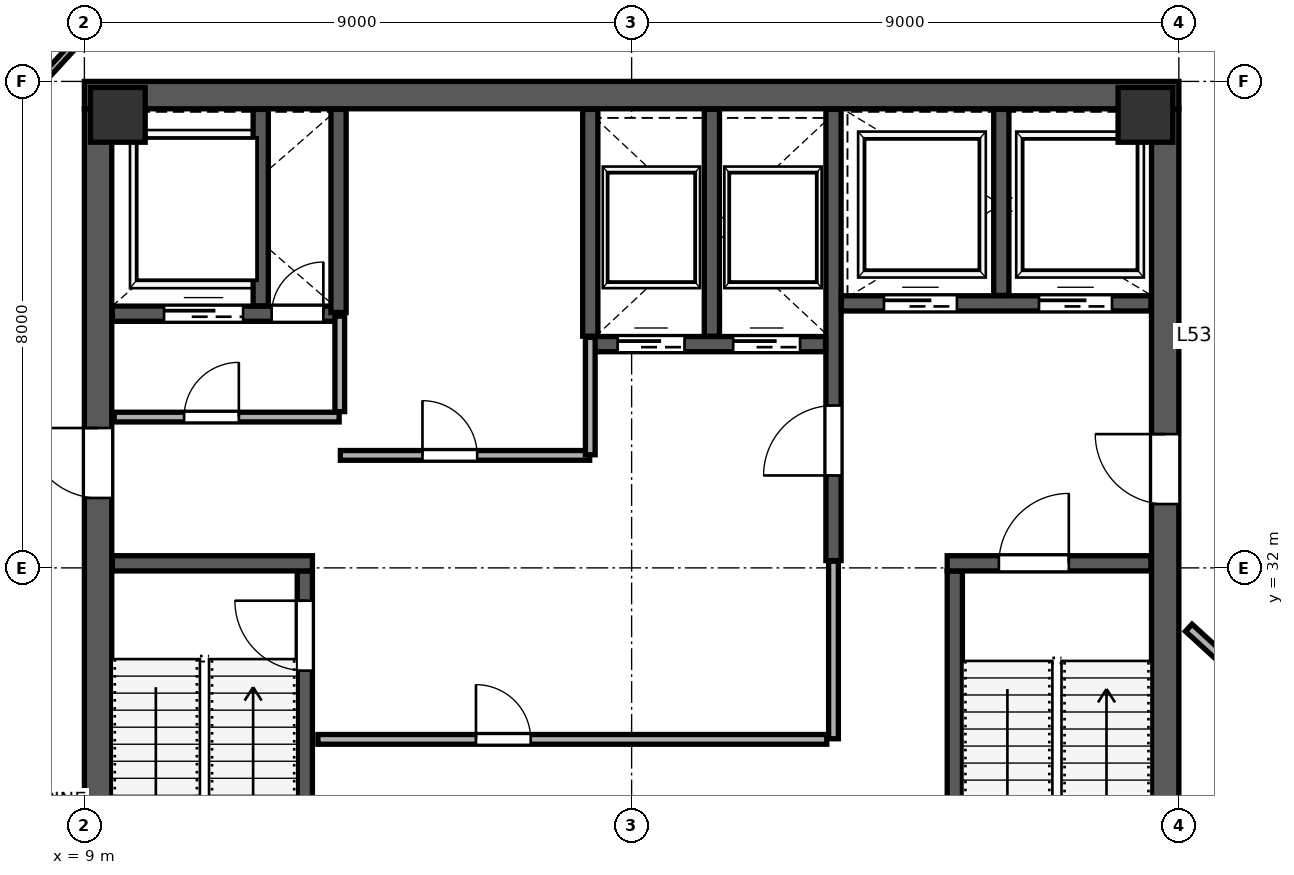
"""IFC4 building model, lengths in metres.
Left out: names, types, materials, properties, quantities, classifications, styles, units other than length and angle.
Written with IfcOpenShell. Run it as: python <this file> out.ifc"""

import sys

from ifc_helpers import new_model, si_unit, direction, frame, frame_2d, origin, origin_2d, place, context, subcontext, project, spatial, rectangle, extrude, source, transform, mapped, element, fill, save


model = new_model("IFC4")
c1 = context("Model", 3, precision=1e-05, world=origin(), true_north=direction((0.0, 1.0)))
c2 = subcontext(c1, "Body", "Model", "MODEL_VIEW")
j1 = project(units=[si_unit("LENGTHUNIT", "METRE"), si_unit("PLANEANGLEUNIT", "RADIAN")], contexts=[c1])
p1 = place(None, origin())
s1 = spatial("IfcSite", under=j1, at=p1, CompositionType="ELEMENT")
p2 = place(p1, origin())
s2 = spatial("IfcBuilding", under=s1, at=p2, CompositionType="ELEMENT")
p3 = place(p2, frame((0.0, 0.0, 237.4)))
s3 = spatial("IfcBuildingStorey", under=s2, at=p3, CompositionType="ELEMENT", Elevation=237.4)
m1 = source(origin(), c2, "Body", "SweptSolid", [
    extrude(rectangle(XDim=0.9, YDim=0.9, at=origin_2d()), origin(), (0.0, 0.0, 1.0), 4.199),
])
for number, where, z_axis, x_axis in (
    (1, (9.55, 39.45, 0.001), (0.0, 0.0, 1.0), (1.0, 0.0, 0.0)),
    (2, (26.45, 39.45, 0.001), (0.0, 0.0, 1.0), (1.0, 0.0, 0.0)),
):
    element("IfcColumn", number, at=place(p3, frame(where, z_axis=z_axis, x_axis=x_axis)), inside=s3, PredefinedType="COLUMN", context=c2, shape_type="MappedRepresentation", body=[
        mapped(m1, transform((0.0, 0.0, 0.0), scale=1.0)),
    ])
p4 = place(p3, frame((9.225, 24.45, 0.0), z_axis=(0.0, 0.0, 1.0), x_axis=(0.0, 1.0, 0.0)))
e3 = element("IfcWall", 3, at=p4, inside=s3, PredefinedType="SHEAR", context=c2, shape_type="SweptSolid", body=[
    extrude(rectangle(XDim=15.1, YDim=0.45, at=frame_2d((7.55, 0.0))), origin(), (0.0, 0.0, 1.0), 3.96),
])
p5 = place(p4, frame((8.7, 0.0, 0.0)))
e4 = element("IfcOpeningElement", 4, at=p5, cuts=e3, PredefinedType="OPENING", context=c2, shape_type="SweptSolid", body=[
    extrude(rectangle(XDim=1.15, YDim=2.2, at=frame_2d((0.575, 1.1))), frame((0.0, 0.235, 0.0), z_axis=(0.0, -1.0, 0.0), x_axis=(1.0, 0.0, 0.0)), (0.0, 0.0, 1.0), 0.47),
])
p6 = place(p3, frame((26.775, 24.45, 0.0), z_axis=(0.0, 0.0, 1.0), x_axis=(0.0, 1.0, 0.0)))
e5 = element("IfcWall", 5, at=p6, inside=s3, PredefinedType="SHEAR", context=c2, shape_type="SweptSolid", body=[
    extrude(rectangle(XDim=15.1, YDim=0.45, at=frame_2d((7.55, 0.0))), origin(), (0.0, 0.0, 1.0), 3.96),
])
p7 = place(p6, frame((8.6, 0.0, 0.0)))
e6 = element("IfcOpeningElement", 6, at=p7, cuts=e5, PredefinedType="OPENING", context=c2, shape_type="SweptSolid", body=[
    extrude(rectangle(XDim=1.15, YDim=2.2, at=frame_2d((0.575, 1.1))), frame((0.0, 0.235, 0.0), z_axis=(0.0, -1.0, 0.0), x_axis=(1.0, 0.0, 0.0)), (0.0, 0.0, 1.0), 0.47),
])
p8 = place(p3, frame((9.0, 39.775, 0.0), z_axis=(0.0, 0.0, 1.0), x_axis=(1.0, 0.0, 0.0)))
e7 = element("IfcWall", 7, at=p8, inside=s3, PredefinedType="SHEAR", context=c2, shape_type="SweptSolid", body=[
    extrude(rectangle(XDim=18.0, YDim=0.45, at=frame_2d((9.0, 0.0))), origin(), (0.0, 0.0, 1.0), 3.96),
])
p9 = place(p3, frame((12.625, 24.46, 0.0), z_axis=(0.0, 0.0, 1.0), x_axis=(0.0, 1.0, 0.0)))
e8 = element("IfcWall", 8, at=p9, inside=s3, PredefinedType="SHEAR", context=c2, shape_type="SweptSolid", body=[
    extrude(rectangle(XDim=7.49, YDim=0.25, at=frame_2d((3.745, 0.0))), origin(), (0.0, 0.0, 1.0), 3.96),
])
p10 = place(p9, frame((5.85, 0.0, 0.0)))
e9 = element("IfcOpeningElement", 9, at=p10, cuts=e8, PredefinedType="OPENING", context=c2, shape_type="SweptSolid", body=[
    extrude(rectangle(XDim=1.15, YDim=2.2, at=frame_2d((0.575, 1.1))), frame((0.0, 0.135, 0.0), z_axis=(0.0, -1.0, 0.0), x_axis=(1.0, 0.0, 0.0)), (0.0, 0.0, 1.0), 0.27),
])
p11 = place(p3, frame((9.46, 32.075, 0.0), z_axis=(0.0, 0.0, 1.0), x_axis=(1.0, 0.0, 0.0)))
e10 = element("IfcWall", 10, at=p11, inside=s3, PredefinedType="SHEAR", context=c2, shape_type="SweptSolid", body=[
    extrude(rectangle(XDim=3.29, YDim=0.25, at=frame_2d((1.645, 0.0))), origin(), (0.0, 0.0, 1.0), 3.96),
])
p12 = place(p3, frame((23.315, 24.46, 0.0), z_axis=(0.0, 0.0, 1.0), x_axis=(0.0, 1.0, 0.0)))
e11 = element("IfcWall", 11, at=p12, inside=s3, PredefinedType="SHEAR", context=c2, shape_type="SweptSolid", body=[
    extrude(rectangle(XDim=7.49, YDim=0.25, at=frame_2d((3.745, 0.0))), origin(), (0.0, 0.0, 1.0), 3.96),
])
p13 = place(p3, frame((23.19, 32.075, 0.0), z_axis=(0.0, 0.0, 1.0), x_axis=(1.0, 0.0, 0.0)))
e12 = element("IfcWall", 12, at=p13, inside=s3, PredefinedType="SHEAR", context=c2, shape_type="SweptSolid", body=[
    extrude(rectangle(XDim=3.35, YDim=0.25, at=frame_2d((1.675, 0.0))), origin(), (0.0, 0.0, 1.0), 3.96),
])
p14 = place(p13, frame((0.85, 0.0, 0.0)))
e13 = element("IfcOpeningElement", 13, at=p14, cuts=e12, PredefinedType="OPENING", context=c2, shape_type="SweptSolid", body=[
    extrude(rectangle(XDim=1.15, YDim=2.2, at=frame_2d((0.575, 1.1))), frame((0.0, 0.135, 0.0), z_axis=(0.0, -1.0, 0.0), x_axis=(1.0, 0.0, 0.0)), (0.0, 0.0, 1.0), 0.27),
])
p15 = place(p3, frame((21.32, 32.12, 0.0), z_axis=(0.0, 0.0, 1.0), x_axis=(0.0, 1.0, 0.0)))
e14 = element("IfcWall", 14, at=p15, inside=s3, PredefinedType="SHEAR", context=c2, shape_type="SweptSolid", body=[
    extrude(rectangle(XDim=7.42, YDim=0.25, at=frame_2d((3.71, 0.0))), origin(), (0.0, 0.0, 1.0), 3.96),
])
p16 = place(p15, frame((1.4, 0.0, 0.0)))
e15 = element("IfcOpeningElement", 15, at=p16, cuts=e14, PredefinedType="OPENING", context=c2, shape_type="SweptSolid", body=[
    extrude(rectangle(XDim=1.15, YDim=2.2, at=frame_2d((0.575, 1.1))), frame((0.0, 0.135, 0.0), z_axis=(0.0, -1.0, 0.0), x_axis=(1.0, 0.0, 0.0)), (0.0, 0.0, 1.0), 0.27),
])
p17 = place(p3, frame((9.46, 36.18, 0.0), z_axis=(0.0, 0.0, 1.0), x_axis=(1.0, 0.0, 0.0)))
e16 = element("IfcWall", 16, at=p17, inside=s3, PredefinedType="SHEAR", context=c2, shape_type="SweptSolid", body=[
    extrude(rectangle(XDim=3.79, YDim=0.25, at=frame_2d((1.895, 0.0))), origin(), (0.0, 0.0, 1.0), 3.96),
])
p18 = place(p17, frame((2.62, 0.0, 0.0)))
e17 = element("IfcOpeningElement", 17, at=p18, cuts=e16, PredefinedType="OPENING", context=c2, shape_type="SweptSolid", body=[
    extrude(rectangle(XDim=0.85, YDim=2.1, at=frame_2d((0.425, 1.05))), frame((0.0, 0.135, 0.0), z_axis=(0.0, -1.0, 0.0), x_axis=(1.0, 0.0, 0.0)), (0.0, 0.0, 1.0), 0.27),
])
p19 = place(p17, frame((0.85, 0.0, 0.0)))
e18 = element("IfcOpeningElement", 18, at=p19, cuts=e16, PredefinedType="OPENING", context=c2, shape_type="SweptSolid", body=[
    extrude(rectangle(XDim=1.3, YDim=2.25, at=frame_2d((0.65, 1.125))), frame((0.0, 0.135, 0.0), z_axis=(0.0, -1.0, 0.0), x_axis=(1.0, 0.0, 0.0)), (0.0, 0.0, 1.0), 0.27),
])
p20 = place(p3, frame((11.9, 36.31, 0.0), z_axis=(0.0, 0.0, 1.0), x_axis=(0.0, 1.0, 0.0)))
e19 = element("IfcWall", 19, at=p20, inside=s3, PredefinedType="SHEAR", context=c2, shape_type="SweptSolid", body=[
    extrude(rectangle(XDim=3.23, YDim=0.25, at=frame_2d((1.615, 0.0))), origin(), (0.0, 0.0, 1.0), 3.96),
])
p21 = place(p3, frame((21.45, 36.35, 0.0), z_axis=(0.0, 0.0, 1.0), x_axis=(1.0, 0.0, 0.0)))
e20 = element("IfcWall", 20, at=p21, inside=s3, PredefinedType="SHEAR", context=c2, shape_type="SweptSolid", body=[
    extrude(rectangle(XDim=5.09, YDim=0.25, at=frame_2d((2.545, 0.0))), origin(), (0.0, 0.0, 1.0), 3.96),
])
p22 = place(p21, frame((0.7, 0.0, 0.0)))
e21 = element("IfcOpeningElement", 21, at=p22, cuts=e20, PredefinedType="OPENING", context=c2, shape_type="SweptSolid", body=[
    extrude(rectangle(XDim=1.2, YDim=2.2, at=frame_2d((0.6, 1.1))), frame((0.0, 0.135, 0.0), z_axis=(0.0, -1.0, 0.0), x_axis=(1.0, 0.0, 0.0)), (0.0, 0.0, 1.0), 0.27),
])
p23 = place(p21, frame((3.25, 0.0, 0.0)))
e22 = element("IfcOpeningElement", 22, at=p23, cuts=e20, PredefinedType="OPENING", context=c2, shape_type="SweptSolid", body=[
    extrude(rectangle(XDim=1.2, YDim=2.2, at=frame_2d((0.6, 1.1))), frame((0.0, 0.135, 0.0), z_axis=(0.0, -1.0, 0.0), x_axis=(1.0, 0.0, 0.0)), (0.0, 0.0, 1.0), 0.27),
])
p24 = place(p3, frame((24.08, 36.48, 0.0), z_axis=(0.0, 0.0, 1.0), x_axis=(0.0, 1.0, 0.0)))
e23 = element("IfcWall", 23, at=p24, inside=s3, PredefinedType="SHEAR", context=c2, shape_type="SweptSolid", body=[
    extrude(rectangle(XDim=3.06, YDim=0.25, at=frame_2d((1.53, 0.0))), origin(), (0.0, 0.0, 1.0), 3.96),
])
p25 = place(p3, frame((13.18, 36.2, 0.0), z_axis=(0.0, 0.0, 1.0), x_axis=(0.0, 1.0, 0.0)))
e24 = element("IfcWall", 24, at=p25, inside=s3, PredefinedType="SHEAR", context=c2, shape_type="SweptSolid", body=[
    extrude(rectangle(XDim=3.34, YDim=0.25, at=frame_2d((1.67, 0.0))), origin(), (0.0, 0.0, 1.0), 3.96),
])
p26 = place(p3, frame((17.32, 35.68, 0.0), z_axis=(0.0, 0.0, 1.0), x_axis=(1.0, 0.0, 0.0)))
e25 = element("IfcWall", 25, at=p26, inside=s3, PredefinedType="SHEAR", context=c2, shape_type="SweptSolid", body=[
    extrude(rectangle(XDim=3.87, YDim=0.25, at=frame_2d((1.935, 0.0))), origin(), (0.0, 0.0, 1.0), 3.96),
])
p27 = place(p26, frame((0.45, 0.0, 0.0)))
e26 = element("IfcOpeningElement", 26, at=p27, cuts=e25, PredefinedType="OPENING", context=c2, shape_type="SweptSolid", body=[
    extrude(rectangle(XDim=1.1, YDim=2.2, at=frame_2d((0.55, 1.1))), frame((0.0, 0.135, 0.0), z_axis=(0.0, -1.0, 0.0), x_axis=(1.0, 0.0, 0.0)), (0.0, 0.0, 1.0), 0.27),
])
p28 = place(p26, frame((2.35, 0.0, 0.0)))
e27 = element("IfcOpeningElement", 27, at=p28, cuts=e25, PredefinedType="OPENING", context=c2, shape_type="SweptSolid", body=[
    extrude(rectangle(XDim=1.1, YDim=2.2, at=frame_2d((0.55, 1.1))), frame((0.0, 0.135, 0.0), z_axis=(0.0, -1.0, 0.0), x_axis=(1.0, 0.0, 0.0)), (0.0, 0.0, 1.0), 0.27),
])
for number, where, z_axis, x_axis in (
    (28, (17.32, 35.81, 0.0), (0.0, 0.0, 1.0), (0.0, 1.0, 0.0)),
    (29, (19.32, 35.81, 0.0), (0.0, 0.0, 1.0), (0.0, 1.0, 0.0)),
):
    element("IfcWall", number, at=place(p3, frame(where, z_axis=z_axis, x_axis=x_axis)), inside=s3, PredefinedType="SHEAR", context=c2, shape_type="SweptSolid", body=[
        extrude(rectangle(XDim=3.73, YDim=0.25, at=frame_2d((1.865, 0.0))), origin(), (0.0, 0.0, 1.0), 3.96),
    ])
p29 = place(p3, frame((9.49, 34.48, 0.0), z_axis=(0.0, 0.0, 1.0), x_axis=(1.0, 0.0, 0.0)))
e30 = element("IfcWall", 30, at=p29, inside=s3, PredefinedType="PARTITIONING", context=c2, shape_type="SweptSolid", body=[
    extrude(rectangle(XDim=3.7, YDim=0.16, at=frame_2d((1.85, 0.0))), origin(), (0.0, 0.0, 1.0), 3.96),
])
p30 = place(p29, frame((1.15, 0.0, 0.0)))
e31 = element("IfcOpeningElement", 31, at=p30, cuts=e30, PredefinedType="OPENING", context=c2, shape_type="SweptSolid", body=[
    extrude(rectangle(XDim=0.9, YDim=2.15, at=frame_2d((0.45, 1.075))), frame((0.0, 0.09, 0.0), z_axis=(0.0, -1.0, 0.0), x_axis=(1.0, 0.0, 0.0)), (0.0, 0.0, 1.0), 0.18),
])
p31 = place(p3, frame((13.2, 34.57, 0.0), z_axis=(0.0, 0.0, 1.0), x_axis=(0.0, 1.0, 0.0)))
e32 = element("IfcWall", 32, at=p31, inside=s3, PredefinedType="PARTITIONING", context=c2, shape_type="SweptSolid", body=[
    extrude(rectangle(XDim=1.57, YDim=0.16, at=frame_2d((0.785, 0.0))), origin(), (0.0, 0.0, 1.0), 3.96),
])
p32 = place(p3, frame((13.21, 33.85, 0.0), z_axis=(0.0, 0.0, 1.0), x_axis=(1.0, 0.0, 0.0)))
e33 = element("IfcWall", 33, at=p32, inside=s3, PredefinedType="PARTITIONING", context=c2, shape_type="SweptSolid", body=[
    extrude(rectangle(XDim=4.1, YDim=0.16, at=frame_2d((2.05, 0.0))), origin(), (0.0, 0.0, 1.0), 3.96),
])
p33 = place(p32, frame((1.35, 0.0, 0.0)))
e34 = element("IfcOpeningElement", 34, at=p33, cuts=e33, PredefinedType="OPENING", context=c2, shape_type="SweptSolid", body=[
    extrude(rectangle(XDim=0.9, YDim=2.15, at=frame_2d((0.45, 1.075))), frame((0.0, 0.09, 0.0), z_axis=(0.0, -1.0, 0.0), x_axis=(1.0, 0.0, 0.0)), (0.0, 0.0, 1.0), 0.18),
])
p34 = place(p3, frame((17.32, 33.86, 0.0), z_axis=(0.0, 0.0, 1.0), x_axis=(0.0, 1.0, 0.0)))
e35 = element("IfcWall", 35, at=p34, inside=s3, PredefinedType="PARTITIONING", context=c2, shape_type="SweptSolid", body=[
    extrude(rectangle(XDim=1.93, YDim=0.16, at=frame_2d((0.965, 0.0))), origin(), (0.0, 0.0, 1.0), 3.96),
])
p35 = place(p3, frame((12.84, 29.18, 0.0), z_axis=(0.0, 0.0, 1.0), x_axis=(1.0, 0.0, 0.0)))
e36 = element("IfcWall", 36, at=p35, inside=s3, PredefinedType="PARTITIONING", context=c2, shape_type="SweptSolid", body=[
    extrude(rectangle(XDim=8.37, YDim=0.16, at=frame_2d((4.185, 0.0))), origin(), (0.0, 0.0, 1.0), 3.96),
])
p36 = place(p35, frame((2.6, 0.0, 0.0)))
e37 = element("IfcOpeningElement", 37, at=p36, cuts=e36, PredefinedType="OPENING", context=c2, shape_type="SweptSolid", body=[
    extrude(rectangle(XDim=0.9, YDim=2.15, at=frame_2d((0.45, 1.075))), frame((0.0, 0.09, 0.0), z_axis=(0.0, -1.0, 0.0), x_axis=(1.0, 0.0, 0.0)), (0.0, 0.0, 1.0), 0.18),
])
p37 = place(p3, frame((21.32, 29.19, 0.0), z_axis=(0.0, 0.0, 1.0), x_axis=(0.0, 1.0, 0.0)))
e38 = element("IfcWall", 38, at=p37, inside=s3, PredefinedType="PARTITIONING", context=c2, shape_type="SweptSolid", body=[
    extrude(rectangle(XDim=2.92, YDim=0.16, at=frame_2d((1.46, 0.0))), origin(), (0.0, 0.0, 1.0), 3.96),
])
p38 = place(p3, frame((27.163, 31.016, 0.0), z_axis=(0.0, 0.0, 1.0), x_axis=(0.737296869908, -0.675568890361, 0.0)))
e39 = element("IfcWall", 39, at=p38, inside=s3, PredefinedType="PARTITIONING", context=c2, shape_type="SweptSolid", body=[
    extrude(rectangle(XDim=1.42, YDim=0.16, at=frame_2d((0.71, 0.0))), origin(), (0.0, 0.0, 1.0), 3.96),
])
p39 = place(p3, frame((17.504, 50.744, 0.0), z_axis=(0.0, 0.0, 1.0), x_axis=(0.737277850523, -0.675589646996, 0.0)))
e40 = element("IfcWall", 40, at=p39, inside=s3, PredefinedType="PARTITIONING", context=c2, shape_type="SweptSolid", body=[
    extrude(rectangle(XDim=21.87, YDim=0.1, at=frame_2d((10.935, 0.0))), origin(), (0.0, 0.0, 1.0), 3.96),
])
p40 = place(p39, frame((5.4, 0.0, 0.0)))
e41 = element("IfcOpeningElement", 41, at=p40, cuts=e40, PredefinedType="OPENING", context=c2, shape_type="SweptSolid", body=[
    extrude(rectangle(XDim=0.95, YDim=2.15, at=frame_2d((0.475, 1.075))), frame((0.0, 0.06, 0.0), z_axis=(0.0, -1.0, 0.0), x_axis=(1.0, 0.0, 0.0)), (0.0, 0.0, 1.0), 0.12),
])
p41 = place(p3, frame((1.73, 32.85, 0.0), z_axis=(0.0, 0.0, 1.0), x_axis=(0.675589845589, 0.737277668546, 0.0)))
e42 = element("IfcWall", 42, at=p41, inside=s3, PredefinedType="PARTITIONING", context=c2, shape_type="SweptSolid", body=[
    extrude(rectangle(XDim=26.742, YDim=0.115, at=frame_2d((13.371, 0.0))), origin(), (0.0, 0.0, 1.0), 3.96),
])
m2 = source(origin(), c2, "Body", "SweptSolid", [
    extrude(rectangle(XDim=1.15, YDim=2.2, at=frame_2d((0.575, 1.1))), frame((0.0, 0.025, 0.0), z_axis=(0.0, -1.0, 0.0), x_axis=(1.0, 0.0, 0.0)), (0.0, 0.0, 1.0), 0.05),
])
p42 = place(p10, origin())
e43 = element("IfcDoor", 43, at=p42, inside=s3, OperationType="SINGLE_SWING_RIGHT", PredefinedType="DOOR", context=c2, shape_type="MappedRepresentation", body=[
    mapped(m2, transform((0.0, 0.0, 0.0), scale=1.0)),
])
fill(e9, e43)
m3 = source(origin(), c2, "Body", "SweptSolid", [
    extrude(rectangle(XDim=1.15, YDim=2.2, at=frame_2d((0.575, 1.1))), frame((0.0, 0.025, 0.0), z_axis=(0.0, -1.0, 0.0), x_axis=(1.0, 0.0, 0.0)), (0.0, 0.0, 1.0), 0.05),
])
p43 = place(p16, origin())
e44 = element("IfcDoor", 44, at=p43, inside=s3, OperationType="SINGLE_SWING_LEFT", PredefinedType="DOOR", context=c2, shape_type="MappedRepresentation", body=[
    mapped(m3, transform((0.0, 0.0, 0.0), scale=1.0)),
])
fill(e15, e44)
p44 = place(p14, origin())
e45 = element("IfcDoor", 45, at=p44, inside=s3, OperationType="SINGLE_SWING_RIGHT", PredefinedType="DOOR", context=c2, shape_type="MappedRepresentation", body=[
    mapped(m2, transform((0.0, 0.0, 0.0), scale=1.0)),
])
fill(e13, e45)
p45 = place(p7, origin())
e46 = element("IfcDoor", 46, at=p45, inside=s3, OperationType="SINGLE_SWING_RIGHT", PredefinedType="DOOR", context=c2, shape_type="MappedRepresentation", body=[
    mapped(m3, transform((0.0, 0.0, 0.0), scale=1.0)),
])
fill(e6, e46)
p46 = place(p5, origin())
e47 = element("IfcDoor", 47, at=p46, inside=s3, OperationType="SINGLE_SWING_RIGHT", PredefinedType="DOOR", context=c2, shape_type="MappedRepresentation", body=[
    mapped(m3, transform((0.0, 0.0, 0.0), scale=1.0)),
])
fill(e4, e47)
m4 = source(origin(), c2, "Body", "SweptSolid", [
    extrude(rectangle(XDim=0.85, YDim=2.1, at=frame_2d((0.425, 1.05))), frame((0.0, 0.025, 0.0), z_axis=(0.0, -1.0, 0.0), x_axis=(1.0, 0.0, 0.0)), (0.0, 0.0, 1.0), 0.05),
])
p47 = place(p18, origin())
e48 = element("IfcDoor", 48, at=p47, inside=s3, OperationType="SINGLE_SWING_RIGHT", PredefinedType="DOOR", context=c2, shape_type="MappedRepresentation", body=[
    mapped(m4, transform((0.0, 0.0, 0.0), scale=1.0)),
])
fill(e17, e48)
m5 = source(origin(), c2, "Body", "SweptSolid", [
    extrude(rectangle(XDim=1.1, YDim=2.2, at=frame_2d((0.55, 1.1))), frame((0.0, 0.025, 0.0), z_axis=(0.0, -1.0, 0.0), x_axis=(1.0, 0.0, 0.0)), (0.0, 0.0, 1.0), 0.05),
])
p48 = place(p27, origin())
e49 = element("IfcDoor", 49, at=p48, inside=s3, OperationType="SLIDING_TO_LEFT", PredefinedType="DOOR", context=c2, shape_type="MappedRepresentation", body=[
    mapped(m5, transform((0.0, 0.0, 0.0), scale=1.0)),
])
fill(e26, e49)
p49 = place(p28, origin())
e50 = element("IfcDoor", 50, at=p49, inside=s3, OperationType="SLIDING_TO_RIGHT", PredefinedType="DOOR", context=c2, shape_type="MappedRepresentation", body=[
    mapped(m5, transform((0.0, 0.0, 0.0), scale=1.0)),
])
fill(e27, e50)
m6 = source(origin(), c2, "Body", "SweptSolid", [
    extrude(rectangle(XDim=1.2, YDim=2.2, at=frame_2d((0.6, 1.1))), frame((0.0, 0.025, 0.0), z_axis=(0.0, -1.0, 0.0), x_axis=(1.0, 0.0, 0.0)), (0.0, 0.0, 1.0), 0.05),
])
p50 = place(p22, origin())
e51 = element("IfcDoor", 51, at=p50, inside=s3, OperationType="SLIDING_TO_LEFT", PredefinedType="DOOR", context=c2, shape_type="MappedRepresentation", body=[
    mapped(m6, transform((0.0, 0.0, 0.0), scale=1.0)),
])
fill(e21, e51)
p51 = place(p23, origin())
e52 = element("IfcDoor", 52, at=p51, inside=s3, OperationType="SLIDING_TO_RIGHT", PredefinedType="DOOR", context=c2, shape_type="MappedRepresentation", body=[
    mapped(m6, transform((0.0, 0.0, 0.0), scale=1.0)),
])
fill(e22, e52)
m7 = source(origin(), c2, "Body", "SweptSolid", [
    extrude(rectangle(XDim=1.3, YDim=2.25, at=frame_2d((0.65, 1.125))), frame((0.0, 0.025, 0.0), z_axis=(0.0, -1.0, 0.0), x_axis=(1.0, 0.0, 0.0)), (0.0, 0.0, 1.0), 0.05),
])
p52 = place(p19, origin())
e53 = element("IfcDoor", 53, at=p52, inside=s3, OperationType="SLIDING_TO_LEFT", PredefinedType="DOOR", context=c2, shape_type="MappedRepresentation", body=[
    mapped(m7, transform((0.0, 0.0, 0.0), scale=1.0)),
])
fill(e18, e53)
m8 = source(origin(), c2, "Body", "SweptSolid", [
    extrude(rectangle(XDim=0.9, YDim=2.15, at=frame_2d((0.45, 1.075))), frame((0.0, 0.025, 0.0), z_axis=(0.0, -1.0, 0.0), x_axis=(1.0, 0.0, 0.0)), (0.0, 0.0, 1.0), 0.05),
])
p53 = place(p30, origin())
e54 = element("IfcDoor", 54, at=p53, inside=s3, OperationType="SINGLE_SWING_RIGHT", PredefinedType="DOOR", context=c2, shape_type="MappedRepresentation", body=[
    mapped(m8, transform((0.0, 0.0, 0.0), scale=1.0)),
])
fill(e31, e54)
p54 = place(p33, origin())
e55 = element("IfcDoor", 55, at=p54, inside=s3, OperationType="SINGLE_SWING_LEFT", PredefinedType="DOOR", context=c2, shape_type="MappedRepresentation", body=[
    mapped(m8, transform((0.0, 0.0, 0.0), scale=1.0)),
])
fill(e34, e55)
p55 = place(p36, origin())
e56 = element("IfcDoor", 56, at=p55, inside=s3, OperationType="SINGLE_SWING_LEFT", PredefinedType="DOOR", context=c2, shape_type="MappedRepresentation", body=[
    mapped(m8, transform((0.0, 0.0, 0.0), scale=1.0)),
])
fill(e37, e56)
save(model, sys.argv[1])
